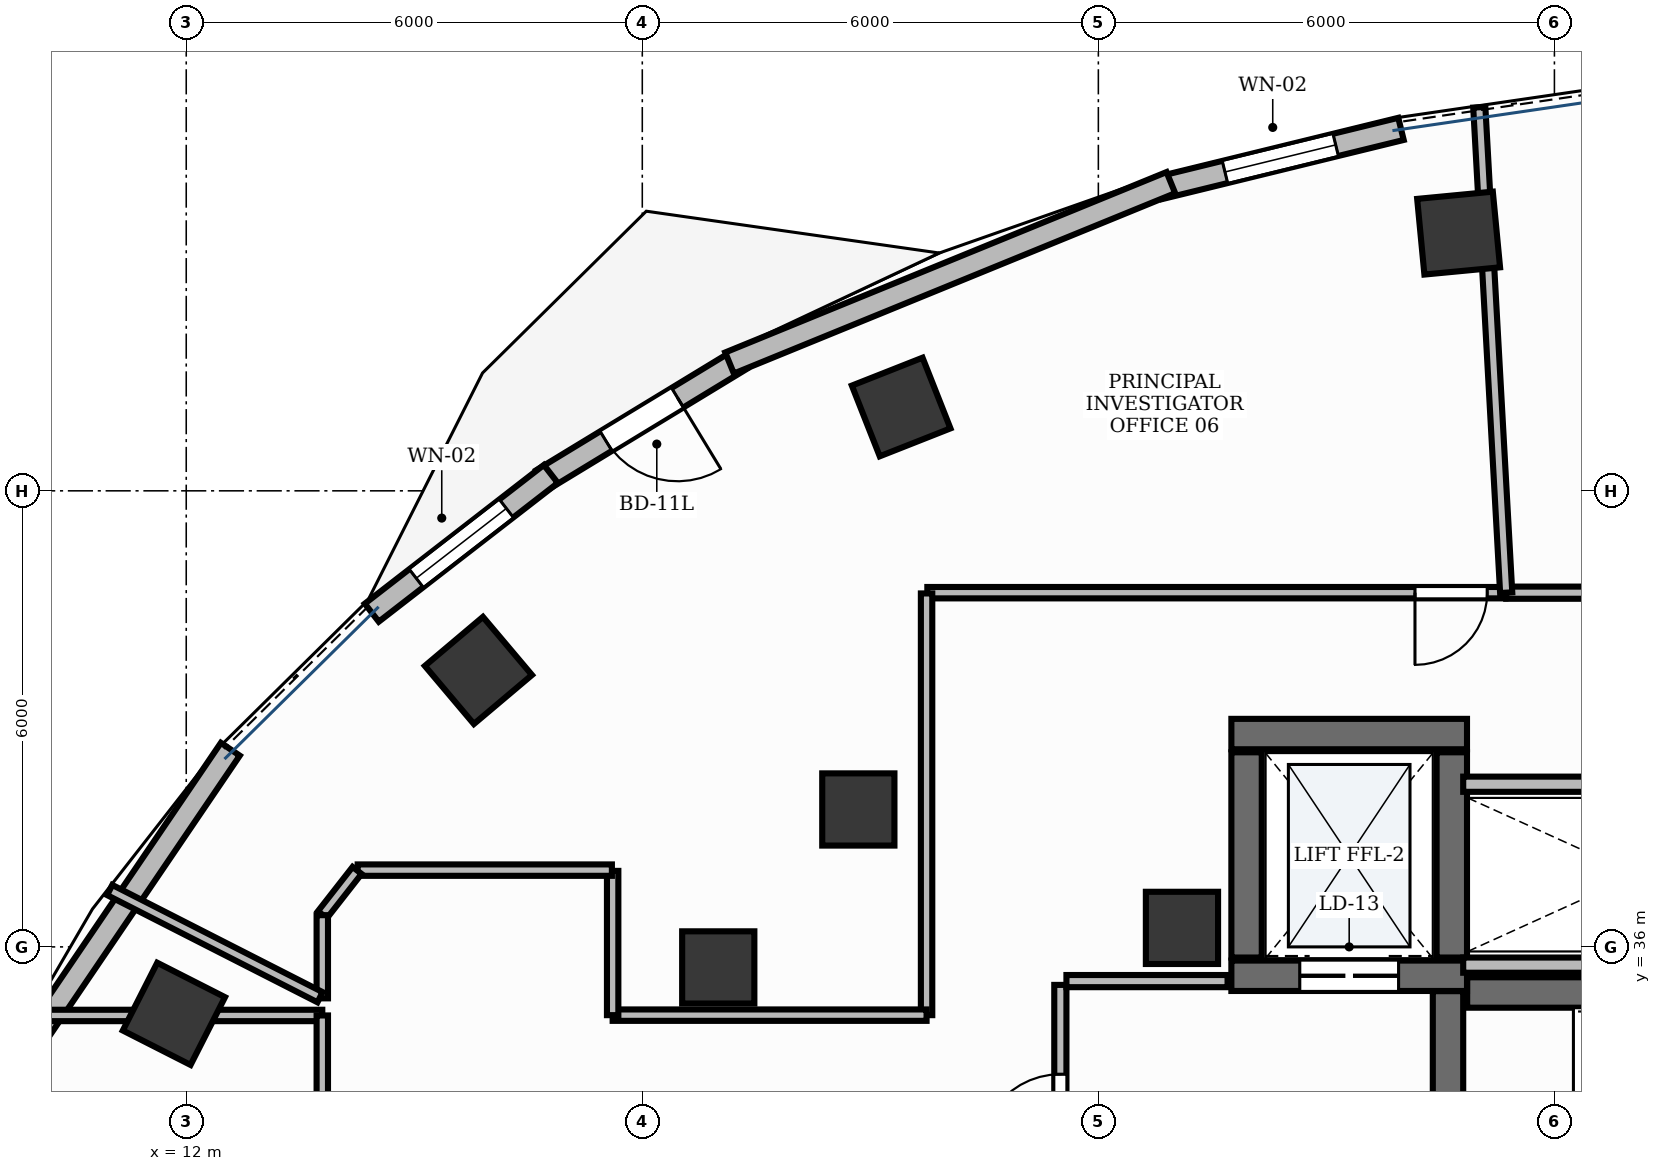
"""IFC4 building model, lengths in metres.
Left out: names, types, materials, properties, quantities, classifications, styles, units other than length and angle.
Written with IfcOpenShell. Run it as: python <this file> out.ifc"""

import sys

from ifc_helpers import new_model, si_unit, direction, frame, frame_2d, origin, origin_2d, place, context, subcontext, project, spatial, rectangle, extrude, element, fill, save


model = new_model("IFC4")
c1 = context("Model", 3, precision=1e-05, world=origin(), true_north=direction((0.0, 1.0)))
c2 = subcontext(c1, "Body", "Model", "MODEL_VIEW")
j1 = project(units=[si_unit("LENGTHUNIT", "METRE"), si_unit("PLANEANGLEUNIT", "RADIAN")], contexts=[c1])
p1 = place(None, origin())
s1 = spatial("IfcSite", under=j1, at=p1, CompositionType="ELEMENT")
p2 = place(p1, origin())
s2 = spatial("IfcBuilding", under=s1, at=p2, CompositionType="ELEMENT")
p3 = place(p2, frame((0.0, 0.0, 175.2)))
s3 = spatial("IfcBuildingStorey", under=s2, at=p3, CompositionType="ELEMENT", Elevation=175.2)
p4 = place(p3, frame((28.852, 35.4, 0.0), z_axis=(0.0, 0.0, 1.0), x_axis=(1.0, 0.0, 0.0)))
e1 = element("IfcWall", 1, at=p4, inside=s3, PredefinedType="SHEAR", context=c2, shape_type="SweptSolid", body=[
    extrude(rectangle(XDim=8.198, YDim=0.4, at=frame_2d((4.099, 0.0))), origin(), (0.0, 0.0, 1.0), 3.9),
])
p5 = place(p3, frame((28.6, 32.11, 0.0), z_axis=(0.0, 0.0, 1.0), x_axis=(0.0, 1.0, 0.0)))
e2 = element("IfcWall", 2, at=p5, inside=s3, PredefinedType="SHEAR", context=c2, shape_type="SweptSolid", body=[
    extrude(rectangle(XDim=3.308, YDim=0.4, at=frame_2d((1.654, 0.0))), origin(), (0.0, 0.0, 1.0), 3.9),
])
p6 = place(p5, frame((0.2, 0.0, 0.0)))
e3 = element("IfcOpeningElement", 3, at=p6, cuts=e2, PredefinedType="OPENING", context=c2, shape_type="SweptSolid", body=[
    extrude(rectangle(XDim=1.05, YDim=2.15, at=frame_2d((0.525, 1.075))), frame((0.0, 0.215, 0.0), z_axis=(0.0, -1.0, 0.0), x_axis=(1.0, 0.0, 0.0)), (0.0, 0.0, 1.0), 0.43),
])
p7 = place(p3, frame((25.75, 38.8, 0.0), z_axis=(0.0, 0.0, 1.0), x_axis=(1.0, 0.0, 0.0)))
e4 = element("IfcWall", 4, at=p7, inside=s3, PredefinedType="SHEAR", context=c2, shape_type="SweptSolid", body=[
    extrude(rectangle(XDim=3.1, YDim=0.4, at=frame_2d((1.55, 0.0))), origin(), (0.0, 0.0, 1.0), 3.9),
])
p8 = place(p3, frame((25.75, 35.62, 0.0), z_axis=(0.0, 0.0, 1.0), x_axis=(1.0, 0.0, 0.0)))
e5 = element("IfcWall", 5, at=p8, inside=s3, PredefinedType="SHEAR", context=c2, shape_type="SweptSolid", body=[
    extrude(rectangle(XDim=3.1, YDim=0.4, at=frame_2d((1.55, 0.0))), origin(), (0.0, 0.0, 1.0), 3.9),
])
p9 = place(p8, frame((0.9, 0.0, 0.0)))
e6 = element("IfcOpeningElement", 6, at=p9, cuts=e5, PredefinedType="OPENING", context=c2, shape_type="SweptSolid", body=[
    extrude(rectangle(XDim=1.3, YDim=2.2, at=frame_2d((0.65, 1.1))), frame((0.0, 0.215, 0.0), z_axis=(0.0, -1.0, 0.0), x_axis=(1.0, 0.0, 0.0)), (0.0, 0.0, 1.0), 0.43),
])
for number, where, z_axis, x_axis in (
    (7, (25.95, 35.86, 0.0), (0.0, 0.0, 1.0), (0.0, 1.0, 0.0)),
    (8, (28.65, 35.86, 0.0), (0.0, 0.0, 1.0), (0.0, 1.0, 0.0)),
):
    element("IfcWall", number, at=place(p3, frame(where, z_axis=z_axis, x_axis=x_axis)), inside=s3, PredefinedType="SHEAR", context=c2, shape_type="SweptSolid", body=[
        extrude(rectangle(XDim=2.7, YDim=0.4, at=frame_2d((1.35, 0.0))), origin(), (0.0, 0.0, 1.0), 3.9),
    ])
p10 = place(p3, frame((25.1, 36.25, -0.0), z_axis=(0.0, 0.0, 1.0), x_axis=(1.0, 0.0, 0.0)))
e9 = element("IfcColumn", 9, at=p10, inside=s3, PredefinedType="PILASTER", context=c2, shape_type="SweptSolid", body=[
    extrude(rectangle(XDim=0.95, YDim=0.95, at=origin_2d()), origin(), (0.0, 0.0, 1.0), 3.901),
])
for number, where, z_axis, x_axis in (
    (10, (28.74, 45.39, -0.0), (0.0, 0.0, 1.0), (0.995, 0.095, 0.0)),
    (11, (21.406, 43.103, -0.0), (0.0, 0.0, 1.0), (0.93, 0.367, 0.0)),
    (12, (15.844, 39.637, -0.0), (0.0, 0.0, 1.0), (0.764, 0.645, 0.0)),
):
    element("IfcColumn", number, at=place(p3, frame(where, z_axis=z_axis, x_axis=x_axis)), inside=s3, PredefinedType="COLUMN", context=c2, shape_type="SweptSolid", body=[
        extrude(rectangle(XDim=1.0, YDim=1.0, at=origin_2d()), origin(), (0.0, 0.0, 1.0), 3.901),
    ])
p11 = place(p3, frame((20.842, 37.808, -0.0), z_axis=(0.0, 0.0, 1.0), x_axis=(1.0, 0.0, 0.0)))
e13 = element("IfcColumn", 13, at=p11, inside=s3, PredefinedType="COLUMN", context=c2, shape_type="SweptSolid", body=[
    extrude(rectangle(XDim=0.95, YDim=0.95, at=origin_2d()), origin(), (0.0, 0.0, 1.0), 3.901),
])
p12 = place(p3, frame((11.838, 35.119, -0.0), z_axis=(0.0, 0.0, 1.0), x_axis=(0.453057191132, 0.891481453292, 0.0)))
e14 = element("IfcColumn", 14, at=p12, inside=s3, PredefinedType="COLUMN", context=c2, shape_type="SweptSolid", body=[
    extrude(rectangle(XDim=1.0, YDim=1.0, at=origin_2d()), origin(), (0.0, 0.0, 1.0), 3.901),
])
p13 = place(p3, frame((19.0, 35.73, -0.0), z_axis=(0.0, 0.0, 1.0), x_axis=(1.0, 0.0, 0.0)))
e15 = element("IfcColumn", 15, at=p13, inside=s3, PredefinedType="COLUMN", context=c2, shape_type="SweptSolid", body=[
    extrude(rectangle(XDim=0.95, YDim=0.95, at=origin_2d()), origin(), (0.0, 0.0, 1.0), 3.901),
])
p14 = place(p3, frame((27.982, 46.762, 0.0), z_axis=(0.0, 0.0, 1.0), x_axis=(-0.971312804689, -0.237805457142, 0.0)))
e16 = element("IfcWall", 16, at=p14, inside=s3, PredefinedType="STANDARD", context=c2, shape_type="SweptSolid", body=[
    extrude(rectangle(XDim=3.269, YDim=0.3, at=frame_2d((1.634, 0.0))), origin(), (0.0, 0.0, 1.0), 3.9),
])
p15 = place(p14, frame((0.885, 0.0, 0.95)))
e17 = element("IfcOpeningElement", 17, at=p15, cuts=e16, PredefinedType="OPENING", context=c2, shape_type="SweptSolid", body=[
    extrude(rectangle(XDim=1.5, YDim=1.8, at=frame_2d((0.75, 0.9))), frame((0.0, 0.165, 0.0), z_axis=(0.0, -1.0, 0.0), x_axis=(1.0, 0.0, 0.0)), (0.0, 0.0, 1.0), 0.33),
])
p16 = place(p3, frame((19.303, 43.736, 0.0), z_axis=(0.0, 0.0, 1.0), x_axis=(-0.85455658592, -0.519358297769, 0.0)))
e18 = element("IfcWall", 18, at=p16, inside=s3, PredefinedType="STANDARD", context=c2, shape_type="SweptSolid", body=[
    extrude(rectangle(XDim=3.066, YDim=0.3, at=frame_2d((1.533, 0.0))), origin(), (0.0, 0.0, 1.0), 3.9),
])
p17 = place(p16, frame((0.983, 0.0, 0.0)))
e19 = element("IfcOpeningElement", 19, at=p17, cuts=e18, PredefinedType="OPENING", context=c2, shape_type="SweptSolid", body=[
    extrude(rectangle(XDim=1.1, YDim=2.15, at=frame_2d((0.55, 1.075))), frame((0.0, 0.165, 0.0), z_axis=(0.0, -1.0, 0.0), x_axis=(1.0, 0.0, 0.0)), (0.0, 0.0, 1.0), 0.33),
])
p18 = place(p3, frame((16.797, 42.222, 0.0), z_axis=(0.0, 0.0, 1.0), x_axis=(-0.790541990178, -0.612407839406, 0.0)))
e20 = element("IfcWall", 20, at=p18, inside=s3, PredefinedType="STANDARD", context=c2, shape_type="SweptSolid", body=[
    extrude(rectangle(XDim=2.979, YDim=0.3, at=frame_2d((1.49, 0.0))), origin(), (0.0, 0.0, 1.0), 3.9),
])
p19 = place(p18, frame((0.74, 0.0, 0.95)))
e21 = element("IfcOpeningElement", 21, at=p19, cuts=e20, PredefinedType="OPENING", context=c2, shape_type="SweptSolid", body=[
    extrude(rectangle(XDim=1.5, YDim=1.8, at=frame_2d((0.75, 0.9))), frame((0.0, 0.165, 0.0), z_axis=(0.0, -1.0, 0.0), x_axis=(1.0, 0.0, 0.0)), (0.0, 0.0, 1.0), 0.33),
])
p20 = place(p3, frame((24.954, 46.055, 0.0), z_axis=(0.0, 0.0, 1.0), x_axis=(-0.925664098805, -0.378346370648, 0.0)))
e22 = element("IfcWall", 22, at=p20, inside=s3, PredefinedType="STANDARD", context=c2, shape_type="SweptSolid", body=[
    extrude(rectangle(XDim=6.272, YDim=0.3, at=frame_2d((3.136, 0.0))), origin(), (0.0, 0.0, 1.0), 3.9),
])
p21 = place(p3, frame((12.58, 38.601, 0.0), z_axis=(0.0, 0.0, 1.0), x_axis=(-0.561663900064, -0.827365495634, 0.0)))
e23 = element("IfcWall", 23, at=p21, inside=s3, PredefinedType="STANDARD", context=c2, shape_type="SweptSolid", body=[
    extrude(rectangle(XDim=5.438, YDim=0.3, at=frame_2d((2.719, 0.0))), origin(), (0.0, 0.0, 1.0), 3.47),
])
for number, where, z_axis, x_axis in (
    (24, (28.8, 35.76, 0.0), (0.0, 0.0, 1.0), (1.0, 0.0, 0.0)),
    (25, (28.8, 38.14, 0.0), (0.0, 0.0, 1.0), (1.0, 0.0, 0.0)),
):
    element("IfcWall", number, at=place(p3, frame(where, z_axis=z_axis, x_axis=x_axis)), inside=s3, PredefinedType="PARTITIONING", context=c2, shape_type="SweptSolid", body=[
        extrude(rectangle(XDim=4.57, YDim=0.2, at=frame_2d((2.285, 0.0))), origin(), (0.0, 0.0, 1.0), 2.91),
    ])
p22 = place(p3, frame((23.5, 32.1, 0.0), z_axis=(0.0, 0.0, 1.0), x_axis=(0.0, 1.0, 0.0)))
e26 = element("IfcWall", 26, at=p22, inside=s3, PredefinedType="PARTITIONING", context=c2, shape_type="SweptSolid", body=[
    extrude(rectangle(XDim=3.4, YDim=0.16, at=frame_2d((1.7, 0.0))), origin(), (0.0, 0.0, 1.0), 2.91),
])
p23 = place(p22, frame((1.175, 0.0, 0.0)))
e27 = element("IfcOpeningElement", 27, at=p23, cuts=e26, PredefinedType="OPENING", context=c2, shape_type="SweptSolid", body=[
    extrude(rectangle(XDim=1.05, YDim=2.15, at=frame_2d((0.525, 1.075))), frame((0.0, 0.095, 0.0), z_axis=(0.0, -1.0, 0.0), x_axis=(1.0, 0.0, 0.0)), (0.0, 0.0, 1.0), 0.19),
])
p24 = place(p3, frame((23.58, 35.55, 0.0), z_axis=(0.0, 0.0, 1.0), x_axis=(1.0, 0.0, 0.0)))
e28 = element("IfcWall", 28, at=p24, inside=s3, PredefinedType="PARTITIONING", context=c2, shape_type="SweptSolid", body=[
    extrude(rectangle(XDim=2.12, YDim=0.16, at=frame_2d((1.06, 0.0))), origin(), (0.0, 0.0, 1.0), 2.91),
])
p25 = place(p3, frame((36.385, 40.66, 0.0), z_axis=(0.0, 0.0, 1.0), x_axis=(-1.0, 0.0, 0.0)))
e29 = element("IfcWall", 29, at=p25, inside=s3, PredefinedType="PARTITIONING", context=c2, shape_type="SweptSolid", body=[
    extrude(rectangle(XDim=7.019, YDim=0.16, at=frame_2d((3.51, 0.0))), origin(), (0.0, 0.0, 1.0), 2.91),
])
p26 = place(p25, frame((1.217, 0.0, 0.0)))
e30 = element("IfcOpeningElement", 30, at=p26, cuts=e29, PredefinedType="OPENING", context=c2, shape_type="SweptSolid", body=[
    extrude(rectangle(XDim=0.95, YDim=2.15, at=frame_2d((0.475, 1.075))), frame((0.0, 0.095, 0.0), z_axis=(0.0, -1.0, 0.0), x_axis=(1.0, 0.0, 0.0)), (0.0, 0.0, 1.0), 0.19),
])
p27 = place(p3, frame((29.355, 40.66, 0.0), z_axis=(0.0, 0.0, 1.0), x_axis=(-1.0, 0.0, 0.0)))
e31 = element("IfcWall", 31, at=p27, inside=s3, PredefinedType="PARTITIONING", context=c2, shape_type="SweptSolid", body=[
    extrude(rectangle(XDim=7.605, YDim=0.15, at=frame_2d((3.803, 0.0))), origin(), (0.0, 0.0, 1.0), 2.91),
])
p28 = place(p27, frame((0.24, 0.0, 0.0)))
e32 = element("IfcOpeningElement", 32, at=p28, cuts=e31, PredefinedType="OPENING", context=c2, shape_type="SweptSolid", body=[
    extrude(rectangle(XDim=0.95, YDim=2.15, at=frame_2d((0.475, 1.075))), frame((0.0, 0.09, 0.0), z_axis=(0.0, -1.0, 0.0), x_axis=(1.0, 0.0, 0.0)), (0.0, 0.0, 1.0), 0.18),
])
p29 = place(p3, frame((10.016, 35.098, 0.0), z_axis=(0.0, 0.0, 1.0), x_axis=(1.0, 0.0, 0.0)))
e33 = element("IfcWall", 33, at=p29, inside=s3, PredefinedType="PARTITIONING", context=c2, shape_type="SweptSolid", body=[
    extrude(rectangle(XDim=3.774, YDim=0.15, at=frame_2d((1.887, 0.0))), origin(), (0.0, 0.0, 1.0), 2.91),
])
p30 = place(p3, frame((13.79, 35.098, 0.0), z_axis=(0.0, 0.0, 1.0), x_axis=(0.0, -1.0, 0.0)))
e34 = element("IfcWall", 34, at=p30, inside=s3, PredefinedType="PARTITIONING", context=c2, shape_type="SweptSolid", body=[
    extrude(rectangle(XDim=3.088, YDim=0.15, at=frame_2d((1.544, 0.0))), origin(), (0.0, 0.0, 1.0), 2.91),
])
p31 = place(p3, frame((29.365, 40.66, 0.0), z_axis=(0.0, 0.0, 1.0), x_axis=(-0.055309349604, 0.99846926635, 0.0)))
e35 = element("IfcWall", 35, at=p31, inside=s3, PredefinedType="PARTITIONING", context=c2, shape_type="SweptSolid", body=[
    extrude(rectangle(XDim=6.396, YDim=0.16, at=frame_2d((3.198, 0.0))), origin(), (0.0, 0.0, 1.0), 2.91),
])
p32 = place(p3, frame((21.74, 40.65, 0.0), z_axis=(0.0, 0.0, 1.0), x_axis=(0.0, -1.0, 0.0)))
e36 = element("IfcWall", 36, at=p32, inside=s3, PredefinedType="PARTITIONING", context=c2, shape_type="SweptSolid", body=[
    extrude(rectangle(XDim=5.548, YDim=0.15, at=frame_2d((2.774, 0.0))), origin(), (0.0, 0.0, 1.0), 2.91),
])
p33 = place(p3, frame((21.74, 35.102, 0.0), z_axis=(0.0, 0.0, 1.0), x_axis=(-1.0, 0.0, 0.0)))
e37 = element("IfcWall", 37, at=p33, inside=s3, PredefinedType="PARTITIONING", context=c2, shape_type="SweptSolid", body=[
    extrude(rectangle(XDim=4.13, YDim=0.15, at=frame_2d((2.065, 0.0))), origin(), (0.0, 0.0, 1.0), 2.91),
])
p34 = place(p3, frame((17.61, 35.102, 0.0), z_axis=(0.0, 0.0, 1.0), x_axis=(0.0, 1.0, 0.0)))
e38 = element("IfcWall", 38, at=p34, inside=s3, PredefinedType="PARTITIONING", context=c2, shape_type="SweptSolid", body=[
    extrude(rectangle(XDim=1.898, YDim=0.15, at=frame_2d((0.949, 0.0))), origin(), (0.0, 0.0, 1.0), 2.91),
])
p35 = place(p3, frame((17.6, 37.01, 0.0), z_axis=(0.0, 0.0, 1.0), x_axis=(-1.0, 0.0, 0.0)))
e39 = element("IfcWall", 39, at=p35, inside=s3, PredefinedType="PARTITIONING", context=c2, shape_type="SweptSolid", body=[
    extrude(rectangle(XDim=3.345, YDim=0.15, at=frame_2d((1.672, 0.0))), origin(), (0.0, 0.0, 1.0), 2.91),
])
p36 = place(p3, frame((14.248, 37.006, 0.0), z_axis=(0.0, 0.0, 1.0), x_axis=(-0.616041172792, -0.787713954063, 0.0)))
e40 = element("IfcWall", 40, at=p36, inside=s3, PredefinedType="PARTITIONING", context=c2, shape_type="SweptSolid", body=[
    extrude(rectangle(XDim=0.74, YDim=0.15, at=frame_2d((0.37, 0.0))), origin(), (0.0, 0.0, 1.0), 2.91),
])
p37 = place(p3, frame((13.79, 36.417, 0.0), z_axis=(0.0, 0.0, 1.0), x_axis=(0.0, -1.0, 0.0)))
e41 = element("IfcWall", 41, at=p37, inside=s3, PredefinedType="PARTITIONING", context=c2, shape_type="SweptSolid", body=[
    extrude(rectangle(XDim=1.094, YDim=0.15, at=frame_2d((0.547, 0.0))), origin(), (0.0, 0.0, 1.0), 2.91),
])
p38 = place(p3, frame((13.76, 35.338, 0.0), z_axis=(0.0, 0.0, 1.0), x_axis=(-0.890989702295, 0.454023513053, 0.0)))
e42 = element("IfcWall", 42, at=p38, inside=s3, PredefinedType="PARTITIONING", context=c2, shape_type="SweptSolid", body=[
    extrude(rectangle(XDim=3.106, YDim=0.15, at=frame_2d((1.553, 0.0))), origin(), (0.0, 0.0, 1.0), 2.91),
])
p39 = place(p15, origin())
e43 = element("IfcWindow", 43, at=p39, inside=s3, PartitioningType="DOUBLE_PANEL_VERTICAL", PredefinedType="WINDOW", context=c2, shape_type="SweptSolid", body=[
    extrude(rectangle(XDim=1.5, YDim=1.8, at=frame_2d((0.75, 0.9))), frame((0.0, 0.03, 0.0), z_axis=(0.0, -1.0, 0.0), x_axis=(1.0, 0.0, 0.0)), (0.0, 0.0, 1.0), 0.06),
])
fill(e17, e43)
p40 = place(p17, origin())
e44 = element("IfcDoor", 44, at=p40, inside=s3, OperationType="SINGLE_SWING_LEFT", PredefinedType="DOOR", context=c2, shape_type="SweptSolid", body=[
    extrude(rectangle(XDim=1.1, YDim=2.15, at=frame_2d((0.55, 1.075))), frame((0.0, 0.025, 0.0), z_axis=(0.0, -1.0, 0.0), x_axis=(1.0, 0.0, 0.0)), (0.0, 0.0, 1.0), 0.05),
])
fill(e19, e44)
p41 = place(p19, origin())
e45 = element("IfcWindow", 45, at=p41, inside=s3, PartitioningType="DOUBLE_PANEL_VERTICAL", PredefinedType="WINDOW", context=c2, shape_type="SweptSolid", body=[
    extrude(rectangle(XDim=1.5, YDim=1.8, at=frame_2d((0.75, 0.9))), frame((0.0, 0.03, 0.0), z_axis=(0.0, -1.0, 0.0), x_axis=(1.0, 0.0, 0.0)), (0.0, 0.0, 1.0), 0.06),
])
fill(e21, e45)
p42 = place(p9, origin())
e46 = element("IfcDoor", 46, at=p42, inside=s3, OperationType="DOUBLE_DOOR_SLIDING", PredefinedType="DOOR", context=c2, shape_type="SweptSolid", body=[
    extrude(rectangle(XDim=1.3, YDim=2.2, at=frame_2d((0.65, 1.1))), frame((0.0, 0.025, 0.0), z_axis=(0.0, -1.0, 0.0), x_axis=(1.0, 0.0, 0.0)), (0.0, 0.0, 1.0), 0.05),
])
fill(e6, e46)
p43 = place(p23, origin())
e47 = element("IfcDoor", 47, at=p43, inside=s3, OperationType="SINGLE_SWING_LEFT", PredefinedType="DOOR", context=c2, shape_type="SweptSolid", body=[
    extrude(rectangle(XDim=1.05, YDim=2.15, at=frame_2d((0.525, 1.075))), frame((0.0, 0.025, 0.0), z_axis=(0.0, -1.0, 0.0), x_axis=(1.0, 0.0, 0.0)), (0.0, 0.0, 1.0), 0.05),
])
fill(e27, e47)
p44 = place(p28, origin())
e48 = element("IfcDoor", 48, at=p44, inside=s3, OperationType="SINGLE_SWING_RIGHT", PredefinedType="DOOR", context=c2, shape_type="SweptSolid", body=[
    extrude(rectangle(XDim=0.95, YDim=2.15, at=frame_2d((0.475, 1.075))), frame((0.0, 0.025, 0.0), z_axis=(0.0, -1.0, 0.0), x_axis=(1.0, 0.0, 0.0)), (0.0, 0.0, 1.0), 0.05),
])
fill(e32, e48)
save(model, sys.argv[1])
